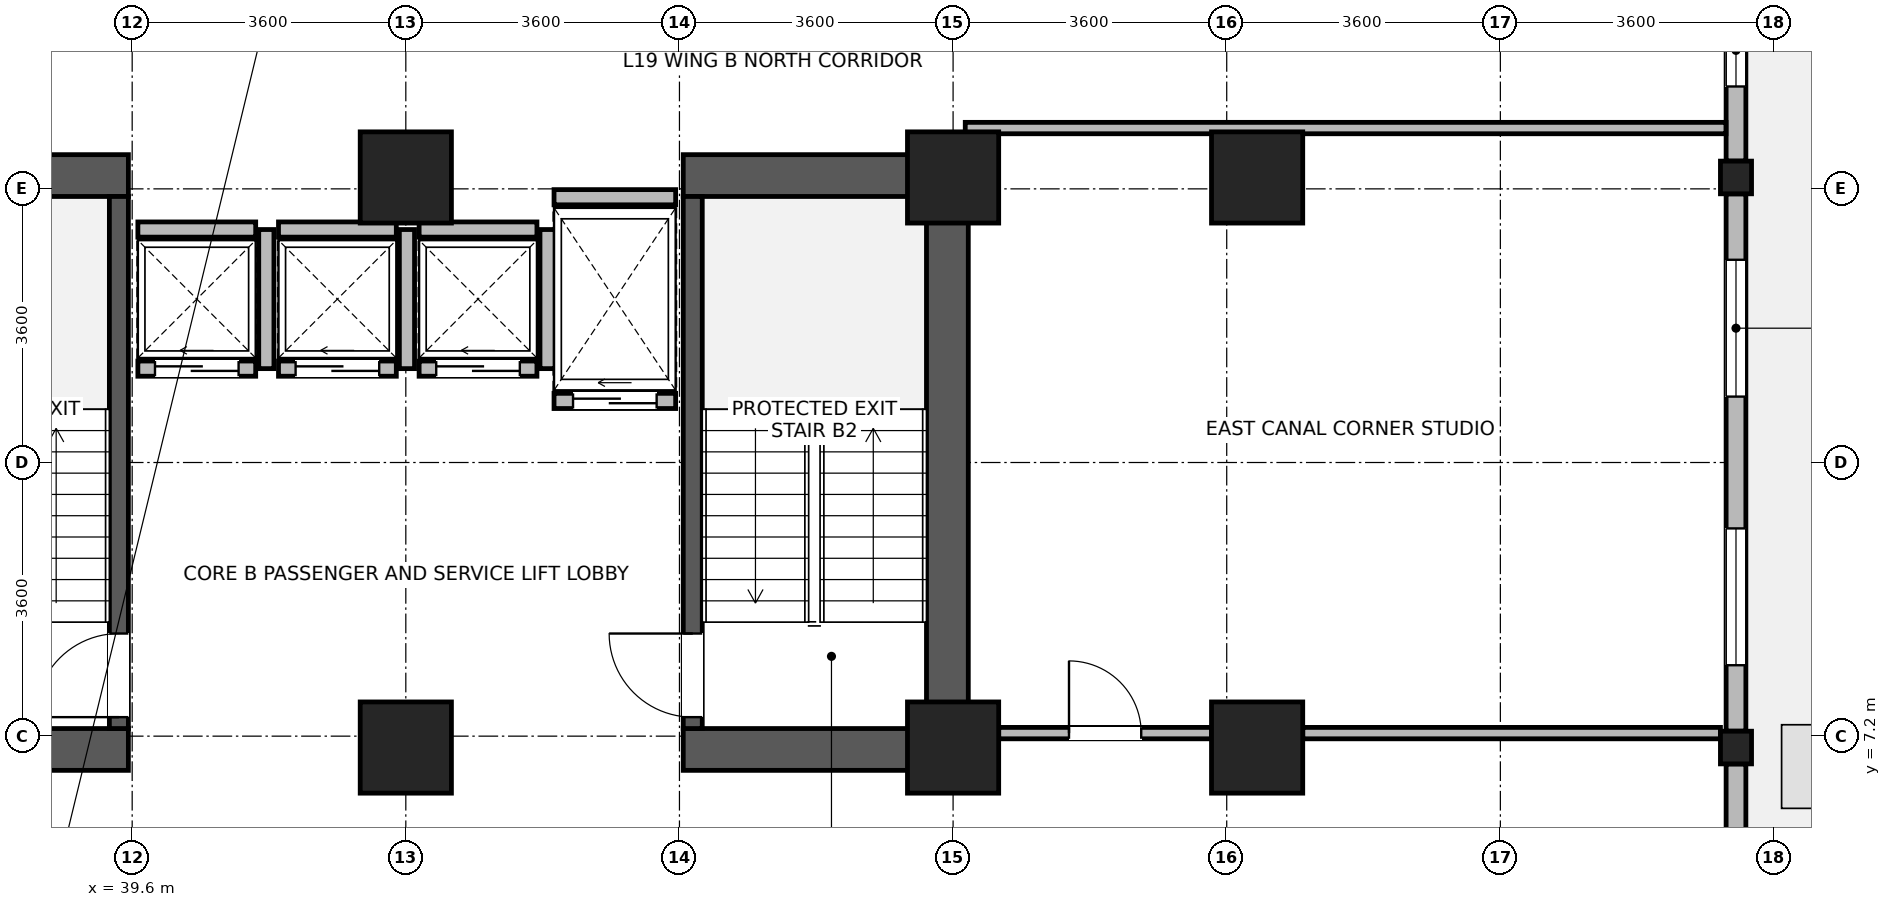
"""IFC4 building model, lengths in metres.
Left out: names, types, materials, properties, quantities, classifications, styles, units other than length and angle.
Written with IfcOpenShell. Run it as: python <this file> out.ifc"""

import sys

from ifc_helpers import new_model, si_unit, direction, frame, frame_2d, origin, origin_2d, place, context, subcontext, project, spatial, rectangle, i_section, extrude, source, transform, mapped, element, fill, save


model = new_model("IFC4")
c1 = context("Model", 3, precision=1e-05, world=origin(), true_north=direction((0.0, 1.0)))
c2 = subcontext(c1, "Body", "Model", "MODEL_VIEW")
j1 = project(units=[si_unit("LENGTHUNIT", "METRE"), si_unit("PLANEANGLEUNIT", "RADIAN")], contexts=[c1])
p1 = place(None, origin())
s1 = spatial("IfcSite", under=j1, at=p1, CompositionType="ELEMENT")
p2 = place(p1, origin())
s2 = spatial("IfcBuilding", under=s1, at=p2, CompositionType="ELEMENT")
p3 = place(p2, frame((0.0, 0.0, 78.6)))
s3 = spatial("IfcBuildingStorey", under=s2, at=p3, CompositionType="ELEMENT", Elevation=78.6)
p4 = place(p3, frame((50.325, 6.75, 0.0), z_axis=(0.0, 0.0, 1.0), x_axis=(0.0, 1.0, 0.0)))
e1 = element("IfcWall", 1, at=p4, inside=s3, PredefinedType="SHEAR", context=c2, shape_type="SweptSolid", body=[
    extrude(rectangle(XDim=8.1, YDim=0.55, at=frame_2d((4.05, 0.0))), origin(), (0.0, 0.0, 1.0), 3.45),
])
for number, where, z_axis, x_axis in (
    (2, (36.35, 7.025, 0.0), (0.0, 0.0, 1.0), (1.0, 0.0, 0.0)),
    (3, (46.85, 7.025, 0.0), (0.0, 0.0, 1.0), (1.0, 0.0, 0.0)),
    (4, (36.35, 14.575, 0.0), (0.0, 0.0, 1.0), (1.0, 0.0, 0.0)),
    (5, (46.85, 14.575, 0.0), (0.0, 0.0, 1.0), (1.0, 0.0, 0.0)),
):
    element("IfcWall", number, at=place(p3, frame(where, z_axis=z_axis, x_axis=x_axis)), inside=s3, PredefinedType="SHEAR", context=c2, shape_type="SweptSolid", body=[
        extrude(rectangle(XDim=3.2, YDim=0.55, at=frame_2d((1.6, 0.0))), origin(), (0.0, 0.0, 1.0), 3.45),
    ])
p5 = place(p3, frame((39.425, 7.3, 0.0), z_axis=(0.0, 0.0, 1.0), x_axis=(0.0, 1.0, 0.0)))
e6 = element("IfcWall", 6, at=p5, inside=s3, PredefinedType="SHEAR", context=c2, shape_type="SweptSolid", body=[
    extrude(rectangle(XDim=7.0, YDim=0.25, at=frame_2d((3.5, 0.0))), origin(), (0.0, 0.0, 1.0), 3.45),
])
p6 = place(p5, frame((0.15, 0.0, 0.0)))
e7 = element("IfcOpeningElement", 7, at=p6, cuts=e6, PredefinedType="OPENING", context=c2, shape_type="SweptSolid", body=[
    extrude(rectangle(XDim=1.1, YDim=2.08, at=frame_2d((0.55, 1.04))), frame((0.0, 0.135, 0.0), z_axis=(0.0, -1.0, 0.0), x_axis=(1.0, 0.0, 0.0)), (0.0, 0.0, 1.0), 0.27),
])
p7 = place(p3, frame((46.975, 7.3, 0.0), z_axis=(0.0, 0.0, 1.0), x_axis=(0.0, 1.0, 0.0)))
e8 = element("IfcWall", 8, at=p7, inside=s3, PredefinedType="SHEAR", context=c2, shape_type="SweptSolid", body=[
    extrude(rectangle(XDim=7.0, YDim=0.25, at=frame_2d((3.5, 0.0))), origin(), (0.0, 0.0, 1.0), 3.45),
])
p8 = place(p7, frame((0.15, 0.0, 0.0)))
e9 = element("IfcOpeningElement", 9, at=p8, cuts=e8, PredefinedType="OPENING", context=c2, shape_type="SweptSolid", body=[
    extrude(rectangle(XDim=1.1, YDim=2.08, at=frame_2d((0.55, 1.04))), frame((0.0, 0.135, 0.0), z_axis=(0.0, -1.0, 0.0), x_axis=(1.0, 0.0, 0.0)), (0.0, 0.0, 1.0), 0.27),
])
m1 = source(origin(), c2, "Body", "SweptSolid", [
    extrude(rectangle(XDim=1.2, YDim=1.2, at=origin_2d()), origin(), (0.0, 0.0, 1.0), 3.7),
])
for number, where, z_axis, x_axis in (
    (10, (43.2, 7.05, 0.0), (0.0, 0.0, 1.0), (1.0, 0.0, 0.0)),
    (11, (43.2, 14.55, 0.0), (0.0, 0.0, 1.0), (1.0, 0.0, 0.0)),
    (12, (50.4, 7.05, 0.0), (0.0, 0.0, 1.0), (1.0, 0.0, 0.0)),
    (13, (50.4, 14.55, 0.0), (0.0, 0.0, 1.0), (1.0, 0.0, 0.0)),
    (14, (54.4, 7.05, 0.0), (0.0, 0.0, 1.0), (1.0, 0.0, 0.0)),
    (15, (54.4, 14.55, 0.0), (0.0, 0.0, 1.0), (1.0, 0.0, 0.0)),
):
    element("IfcColumn", number, at=place(p3, frame(where, z_axis=z_axis, x_axis=x_axis)), inside=s3, PredefinedType="COLUMN", context=c2, shape_type="MappedRepresentation", body=[
        mapped(m1, transform((0.0, 0.0, 0.0), x_axis=(1.0, 0.0, 0.0), y_axis=(0.0, 1.0, 0.0), z_axis=(0.0, 0.0, 1.0), scale=1.0)),
    ])
m2 = source(origin(), c2, "Body", "SweptSolid", [
    extrude(i_section(OverallWidth=0.409, OverallDepth=0.43, WebThickness=0.024, FlangeThickness=0.033, FilletRadius=0.015, at=origin_2d()), origin(), (0.0, 0.0, 1.0), 3.7),
])
for number, where, z_axis, x_axis in (
    (16, (60.7, 7.05, 0.0), (0.0, 0.0, 1.0), (1.0, 0.0, 0.0)),
    (17, (60.7, 14.55, 0.0), (0.0, 0.0, 1.0), (1.0, 0.0, 0.0)),
):
    element("IfcColumn", number, at=place(p3, frame(where, z_axis=z_axis, x_axis=x_axis)), inside=s3, PredefinedType="COLUMN", context=c2, shape_type="MappedRepresentation", body=[
        mapped(m2, transform((0.0, 0.0, 0.0), x_axis=(1.0, 0.0, 0.0), y_axis=(0.0, 1.0, 0.0), z_axis=(0.0, 0.0, 1.0), scale=1.0)),
    ])
p9 = place(p3, frame((60.7, 6.834, 0.0), z_axis=(0.0, 0.0, 1.0), x_axis=(0.0, -1.0, 0.0)))
e18 = element("IfcWall", 18, at=p9, inside=s3, PredefinedType="STANDARD", context=c2, shape_type="SweptSolid", body=[
    extrude(rectangle(XDim=5.164, YDim=0.26, at=frame_2d((2.582, 0.0))), origin(), (0.0, 0.0, 1.0), 3.43),
])
p10 = place(p9, frame((2.865, 0.0, 0.0)))
e19 = element("IfcOpeningElement", 19, at=p10, cuts=e18, PredefinedType="OPENING", context=c2, shape_type="SweptSolid", body=[
    extrude(rectangle(XDim=1.5, YDim=2.15, at=frame_2d((0.75, 1.075))), frame((0.0, 0.14, 0.0), z_axis=(0.0, -1.0, 0.0), x_axis=(1.0, 0.0, 0.0)), (0.0, 0.0, 1.0), 0.28),
])
p11 = place(p3, frame((60.7, 14.334, 0.0), z_axis=(0.0, 0.0, 1.0), x_axis=(0.0, -1.0, 0.0)))
e20 = element("IfcWall", 20, at=p11, inside=s3, PredefinedType="STANDARD", context=c2, shape_type="SweptSolid", body=[
    extrude(rectangle(XDim=7.068, YDim=0.26, at=frame_2d((3.534, 0.0))), origin(), (0.0, 0.0, 1.0), 2.93),
])
p12 = place(p11, frame((0.867, 0.0, 0.85)))
e21 = element("IfcOpeningElement", 21, at=p12, cuts=e20, PredefinedType="OPENING", context=c2, shape_type="SweptSolid", body=[
    extrude(rectangle(XDim=1.8, YDim=1.85, at=frame_2d((0.9, 0.925))), frame((0.0, 0.14, 0.0), z_axis=(0.0, -1.0, 0.0), x_axis=(1.0, 0.0, 0.0)), (0.0, 0.0, 1.0), 0.28),
])
p13 = place(p11, frame((4.401, 0.0, 0.85)))
e22 = element("IfcOpeningElement", 22, at=p13, cuts=e20, PredefinedType="OPENING", context=c2, shape_type="SweptSolid", body=[
    extrude(rectangle(XDim=1.8, YDim=1.85, at=frame_2d((0.9, 0.925))), frame((0.0, 0.14, 0.0), z_axis=(0.0, -1.0, 0.0), x_axis=(1.0, 0.0, 0.0)), (0.0, 0.0, 1.0), 0.28),
])
p14 = place(p3, frame((60.7, 21.384, 0.0), z_axis=(0.0, 0.0, 1.0), x_axis=(0.0, -1.0, 0.0)))
e23 = element("IfcWall", 23, at=p14, inside=s3, PredefinedType="STANDARD", context=c2, shape_type="SweptSolid", body=[
    extrude(rectangle(XDim=6.618, YDim=0.26, at=frame_2d((3.309, 0.0))), origin(), (0.0, 0.0, 1.0), 2.93),
])
p15 = place(p14, frame((0.754, 0.0, 0.85)))
e24 = element("IfcOpeningElement", 24, at=p15, cuts=e23, PredefinedType="OPENING", context=c2, shape_type="SweptSolid", body=[
    extrude(rectangle(XDim=1.8, YDim=1.85, at=frame_2d((0.9, 0.925))), frame((0.0, 0.14, 0.0), z_axis=(0.0, -1.0, 0.0), x_axis=(1.0, 0.0, 0.0)), (0.0, 0.0, 1.0), 0.28),
])
p16 = place(p14, frame((4.687, 0.0, 0.85)))
e25 = element("IfcOpeningElement", 25, at=p16, cuts=e23, PredefinedType="OPENING", context=c2, shape_type="SweptSolid", body=[
    extrude(rectangle(XDim=0.95, YDim=1.75, at=frame_2d((0.475, 0.875))), frame((0.0, 0.14, 0.0), z_axis=(0.0, -1.0, 0.0), x_axis=(1.0, 0.0, 0.0)), (0.0, 0.0, 1.0), 0.28),
])
p17 = place(p3, frame((39.675, 12.035, 0.0), z_axis=(0.0, 0.0, 1.0), x_axis=(1.0, 0.0, 0.0)))
e26 = element("IfcWall", 26, at=p17, inside=s3, PredefinedType="PARTITIONING", context=c2, shape_type="SweptSolid", body=[
    extrude(rectangle(XDim=1.55, YDim=0.2, at=frame_2d((0.775, 0.0))), origin(), (0.0, 0.0, 1.0), 3.43),
])
p18 = place(p17, frame((0.225, 0.0, 0.0)))
e27 = element("IfcOpeningElement", 27, at=p18, cuts=e26, PredefinedType="OPENING", context=c2, shape_type="SweptSolid", body=[
    extrude(rectangle(XDim=1.1, YDim=2.12, at=frame_2d((0.55, 1.06))), frame((0.0, 0.11, 0.0), z_axis=(0.0, -1.0, 0.0), x_axis=(1.0, 0.0, 0.0)), (0.0, 0.0, 1.0), 0.22),
])
p19 = place(p3, frame((39.675, 13.865, 0.0), z_axis=(0.0, 0.0, 1.0), x_axis=(1.0, 0.0, 0.0)))
e28 = element("IfcWall", 28, at=p19, inside=s3, PredefinedType="PARTITIONING", context=c2, shape_type="SweptSolid", body=[
    extrude(rectangle(XDim=1.55, YDim=0.2, at=frame_2d((0.775, 0.0))), origin(), (0.0, 0.0, 1.0), 3.43),
])
p20 = place(p3, frame((41.365, 12.035, 0.0), z_axis=(0.0, 0.0, 1.0), x_axis=(0.0, 1.0, 0.0)))
e29 = element("IfcWall", 29, at=p20, inside=s3, PredefinedType="PARTITIONING", context=c2, shape_type="SweptSolid", body=[
    extrude(rectangle(XDim=1.83, YDim=0.2, at=frame_2d((0.915, 0.0))), origin(), (0.0, 0.0, 1.0), 3.43),
])
p21 = place(p3, frame((41.525, 12.035, 0.0), z_axis=(0.0, 0.0, 1.0), x_axis=(1.0, 0.0, 0.0)))
e30 = element("IfcWall", 30, at=p21, inside=s3, PredefinedType="PARTITIONING", context=c2, shape_type="SweptSolid", body=[
    extrude(rectangle(XDim=1.55, YDim=0.2, at=frame_2d((0.775, 0.0))), origin(), (0.0, 0.0, 1.0), 3.43),
])
p22 = place(p21, frame((0.225, 0.0, 0.0)))
e31 = element("IfcOpeningElement", 31, at=p22, cuts=e30, PredefinedType="OPENING", context=c2, shape_type="SweptSolid", body=[
    extrude(rectangle(XDim=1.1, YDim=2.12, at=frame_2d((0.55, 1.06))), frame((0.0, 0.11, 0.0), z_axis=(0.0, -1.0, 0.0), x_axis=(1.0, 0.0, 0.0)), (0.0, 0.0, 1.0), 0.22),
])
p23 = place(p3, frame((41.525, 13.865, 0.0), z_axis=(0.0, 0.0, 1.0), x_axis=(1.0, 0.0, 0.0)))
e32 = element("IfcWall", 32, at=p23, inside=s3, PredefinedType="PARTITIONING", context=c2, shape_type="SweptSolid", body=[
    extrude(rectangle(XDim=1.55, YDim=0.2, at=frame_2d((0.775, 0.0))), origin(), (0.0, 0.0, 1.0), 3.43),
])
p24 = place(p3, frame((43.215, 12.035, 0.0), z_axis=(0.0, 0.0, 1.0), x_axis=(0.0, 1.0, 0.0)))
e33 = element("IfcWall", 33, at=p24, inside=s3, PredefinedType="PARTITIONING", context=c2, shape_type="SweptSolid", body=[
    extrude(rectangle(XDim=1.83, YDim=0.2, at=frame_2d((0.915, 0.0))), origin(), (0.0, 0.0, 1.0), 3.43),
])
p25 = place(p3, frame((43.375, 12.035, 0.0), z_axis=(0.0, 0.0, 1.0), x_axis=(1.0, 0.0, 0.0)))
e34 = element("IfcWall", 34, at=p25, inside=s3, PredefinedType="PARTITIONING", context=c2, shape_type="SweptSolid", body=[
    extrude(rectangle(XDim=1.55, YDim=0.2, at=frame_2d((0.775, 0.0))), origin(), (0.0, 0.0, 1.0), 3.43),
])
p26 = place(p25, frame((0.225, 0.0, 0.0)))
e35 = element("IfcOpeningElement", 35, at=p26, cuts=e34, PredefinedType="OPENING", context=c2, shape_type="SweptSolid", body=[
    extrude(rectangle(XDim=1.1, YDim=2.12, at=frame_2d((0.55, 1.06))), frame((0.0, 0.11, 0.0), z_axis=(0.0, -1.0, 0.0), x_axis=(1.0, 0.0, 0.0)), (0.0, 0.0, 1.0), 0.22),
])
p27 = place(p3, frame((43.375, 13.865, 0.0), z_axis=(0.0, 0.0, 1.0), x_axis=(1.0, 0.0, 0.0)))
e36 = element("IfcWall", 36, at=p27, inside=s3, PredefinedType="PARTITIONING", context=c2, shape_type="SweptSolid", body=[
    extrude(rectangle(XDim=1.55, YDim=0.2, at=frame_2d((0.775, 0.0))), origin(), (0.0, 0.0, 1.0), 3.43),
])
p28 = place(p3, frame((45.065, 12.035, 0.0), z_axis=(0.0, 0.0, 1.0), x_axis=(0.0, 1.0, 0.0)))
e37 = element("IfcWall", 37, at=p28, inside=s3, PredefinedType="PARTITIONING", context=c2, shape_type="SweptSolid", body=[
    extrude(rectangle(XDim=1.83, YDim=0.2, at=frame_2d((0.915, 0.0))), origin(), (0.0, 0.0, 1.0), 3.43),
])
p29 = place(p3, frame((45.15, 11.61, 0.0), z_axis=(0.0, 0.0, 1.0), x_axis=(1.0, 0.0, 0.0)))
e38 = element("IfcWall", 38, at=p29, inside=s3, PredefinedType="PARTITIONING", context=c2, shape_type="SweptSolid", body=[
    extrude(rectangle(XDim=1.6, YDim=0.2, at=frame_2d((0.8, 0.0))), origin(), (0.0, 0.0, 1.0), 3.43),
])
p30 = place(p29, frame((0.25, 0.0, 0.0)))
e39 = element("IfcOpeningElement", 39, at=p30, cuts=e38, PredefinedType="OPENING", context=c2, shape_type="SweptSolid", body=[
    extrude(rectangle(XDim=1.1, YDim=2.12, at=frame_2d((0.55, 1.06))), frame((0.0, 0.11, 0.0), z_axis=(0.0, -1.0, 0.0), x_axis=(1.0, 0.0, 0.0)), (0.0, 0.0, 1.0), 0.22),
])
p31 = place(p3, frame((45.15, 14.29, 0.0), z_axis=(0.0, 0.0, 1.0), x_axis=(1.0, 0.0, 0.0)))
e40 = element("IfcWall", 40, at=p31, inside=s3, PredefinedType="PARTITIONING", context=c2, shape_type="SweptSolid", body=[
    extrude(rectangle(XDim=1.6, YDim=0.2, at=frame_2d((0.8, 0.0))), origin(), (0.0, 0.0, 1.0), 2.23),
])
p32 = place(p3, frame((51.0, 7.24, 0.0), z_axis=(0.0, 0.0, 1.0), x_axis=(1.0, 0.0, 0.0)))
e41 = element("IfcWall", 41, at=p32, inside=s3, PredefinedType="PARTITIONING", context=c2, shape_type="SweptSolid", body=[
    extrude(rectangle(XDim=2.8, YDim=0.15, at=frame_2d((1.4, 0.0))), origin(), (0.0, 0.0, 1.0), 2.78),
])
p33 = place(p32, frame((0.925, 0.0, 0.0)))
e42 = element("IfcOpeningElement", 42, at=p33, cuts=e41, PredefinedType="OPENING", context=c2, shape_type="SweptSolid", body=[
    extrude(rectangle(XDim=0.95, YDim=2.1, at=frame_2d((0.475, 1.05))), frame((0.0, 0.085, 0.0), z_axis=(0.0, -1.0, 0.0), x_axis=(1.0, 0.0, 0.0)), (0.0, 0.0, 1.0), 0.17),
])
p34 = place(p3, frame((55.0, 7.24, 0.0), z_axis=(0.0, 0.0, 1.0), x_axis=(1.0, 0.0, 0.0)))
e43 = element("IfcWall", 43, at=p34, inside=s3, PredefinedType="PARTITIONING", context=c2, shape_type="SweptSolid", body=[
    extrude(rectangle(XDim=5.496, YDim=0.15, at=frame_2d((2.748, 0.0))), origin(), (0.0, 0.0, 1.0), 2.78),
])
p35 = place(p3, frame((50.56, 15.2, 0.0), z_axis=(0.0, 0.0, 1.0), x_axis=(1.0, 0.0, 0.0)))
e44 = element("IfcWall", 44, at=p35, inside=s3, PredefinedType="PARTITIONING", context=c2, shape_type="SweptSolid", body=[
    extrude(rectangle(XDim=10.008, YDim=0.15, at=frame_2d((5.004, 0.0))), origin(), (0.0, 0.0, 1.0), 3.43),
])
p36 = place(p12, origin())
e45 = element("IfcWindow", 45, at=p36, inside=s3, PartitioningType="SINGLE_PANEL", PredefinedType="WINDOW", context=c2, shape_type="SweptSolid", body=[
    extrude(rectangle(XDim=1.8, YDim=1.85, at=frame_2d((0.9, 0.925))), frame((0.0, 0.03, 0.0), z_axis=(0.0, -1.0, 0.0), x_axis=(1.0, 0.0, 0.0)), (0.0, 0.0, 1.0), 0.06),
])
fill(e21, e45)
p37 = place(p13, origin())
e46 = element("IfcWindow", 46, at=p37, inside=s3, PartitioningType="SINGLE_PANEL", PredefinedType="WINDOW", context=c2, shape_type="SweptSolid", body=[
    extrude(rectangle(XDim=1.8, YDim=1.85, at=frame_2d((0.9, 0.925))), frame((0.0, 0.03, 0.0), z_axis=(0.0, -1.0, 0.0), x_axis=(1.0, 0.0, 0.0)), (0.0, 0.0, 1.0), 0.06),
])
fill(e22, e46)
p38 = place(p16, origin())
e47 = element("IfcWindow", 47, at=p38, inside=s3, PartitioningType="SINGLE_PANEL", PredefinedType="WINDOW", context=c2, shape_type="SweptSolid", body=[
    extrude(rectangle(XDim=0.95, YDim=1.75, at=frame_2d((0.475, 0.875))), frame((0.0, 0.03, 0.0), z_axis=(0.0, -1.0, 0.0), x_axis=(1.0, 0.0, 0.0)), (0.0, 0.0, 1.0), 0.06),
])
fill(e25, e47)
p39 = place(p6, origin())
e48 = element("IfcDoor", 48, at=p39, inside=s3, OperationType="SINGLE_SWING_LEFT", PredefinedType="DOOR", context=c2, shape_type="SweptSolid", body=[
    extrude(rectangle(XDim=1.1, YDim=2.08, at=frame_2d((0.55, 1.04))), frame((0.0, 0.025, 0.0), z_axis=(0.0, -1.0, 0.0), x_axis=(1.0, 0.0, 0.0)), (0.0, 0.0, 1.0), 0.05),
])
fill(e7, e48)
p40 = place(p8, origin())
e49 = element("IfcDoor", 49, at=p40, inside=s3, OperationType="SINGLE_SWING_RIGHT", PredefinedType="DOOR", context=c2, shape_type="SweptSolid", body=[
    extrude(rectangle(XDim=1.1, YDim=2.08, at=frame_2d((0.55, 1.04))), frame((0.0, 0.025, 0.0), z_axis=(0.0, -1.0, 0.0), x_axis=(1.0, 0.0, 0.0)), (0.0, 0.0, 1.0), 0.05),
])
fill(e9, e49)
p41 = place(p18, origin())
e50 = element("IfcDoor", 50, at=p41, inside=s3, OperationType="SLIDING_TO_LEFT", PredefinedType="DOOR", context=c2, shape_type="SweptSolid", body=[
    extrude(rectangle(XDim=1.1, YDim=2.12, at=frame_2d((0.55, 1.06))), frame((0.0, 0.025, 0.0), z_axis=(0.0, -1.0, 0.0), x_axis=(1.0, 0.0, 0.0)), (0.0, 0.0, 1.0), 0.05),
])
fill(e27, e50)
p42 = place(p22, origin())
e51 = element("IfcDoor", 51, at=p42, inside=s3, OperationType="SLIDING_TO_LEFT", PredefinedType="DOOR", context=c2, shape_type="SweptSolid", body=[
    extrude(rectangle(XDim=1.1, YDim=2.12, at=frame_2d((0.55, 1.06))), frame((0.0, 0.025, 0.0), z_axis=(0.0, -1.0, 0.0), x_axis=(1.0, 0.0, 0.0)), (0.0, 0.0, 1.0), 0.05),
])
fill(e31, e51)
p43 = place(p26, origin())
e52 = element("IfcDoor", 52, at=p43, inside=s3, OperationType="SLIDING_TO_LEFT", PredefinedType="DOOR", context=c2, shape_type="SweptSolid", body=[
    extrude(rectangle(XDim=1.1, YDim=2.12, at=frame_2d((0.55, 1.06))), frame((0.0, 0.025, 0.0), z_axis=(0.0, -1.0, 0.0), x_axis=(1.0, 0.0, 0.0)), (0.0, 0.0, 1.0), 0.05),
])
fill(e35, e52)
p44 = place(p30, origin())
e53 = element("IfcDoor", 53, at=p44, inside=s3, OperationType="SLIDING_TO_LEFT", PredefinedType="DOOR", context=c2, shape_type="SweptSolid", body=[
    extrude(rectangle(XDim=1.1, YDim=2.12, at=frame_2d((0.55, 1.06))), frame((0.0, 0.025, 0.0), z_axis=(0.0, -1.0, 0.0), x_axis=(1.0, 0.0, 0.0)), (0.0, 0.0, 1.0), 0.05),
])
fill(e39, e53)
p45 = place(p33, origin())
e54 = element("IfcDoor", 54, at=p45, inside=s3, OperationType="SINGLE_SWING_LEFT", PredefinedType="DOOR", context=c2, shape_type="SweptSolid", body=[
    extrude(rectangle(XDim=0.95, YDim=2.1, at=frame_2d((0.475, 1.05))), frame((0.0, 0.025, 0.0), z_axis=(0.0, -1.0, 0.0), x_axis=(1.0, 0.0, 0.0)), (0.0, 0.0, 1.0), 0.05),
])
fill(e42, e54)
save(model, sys.argv[1])
